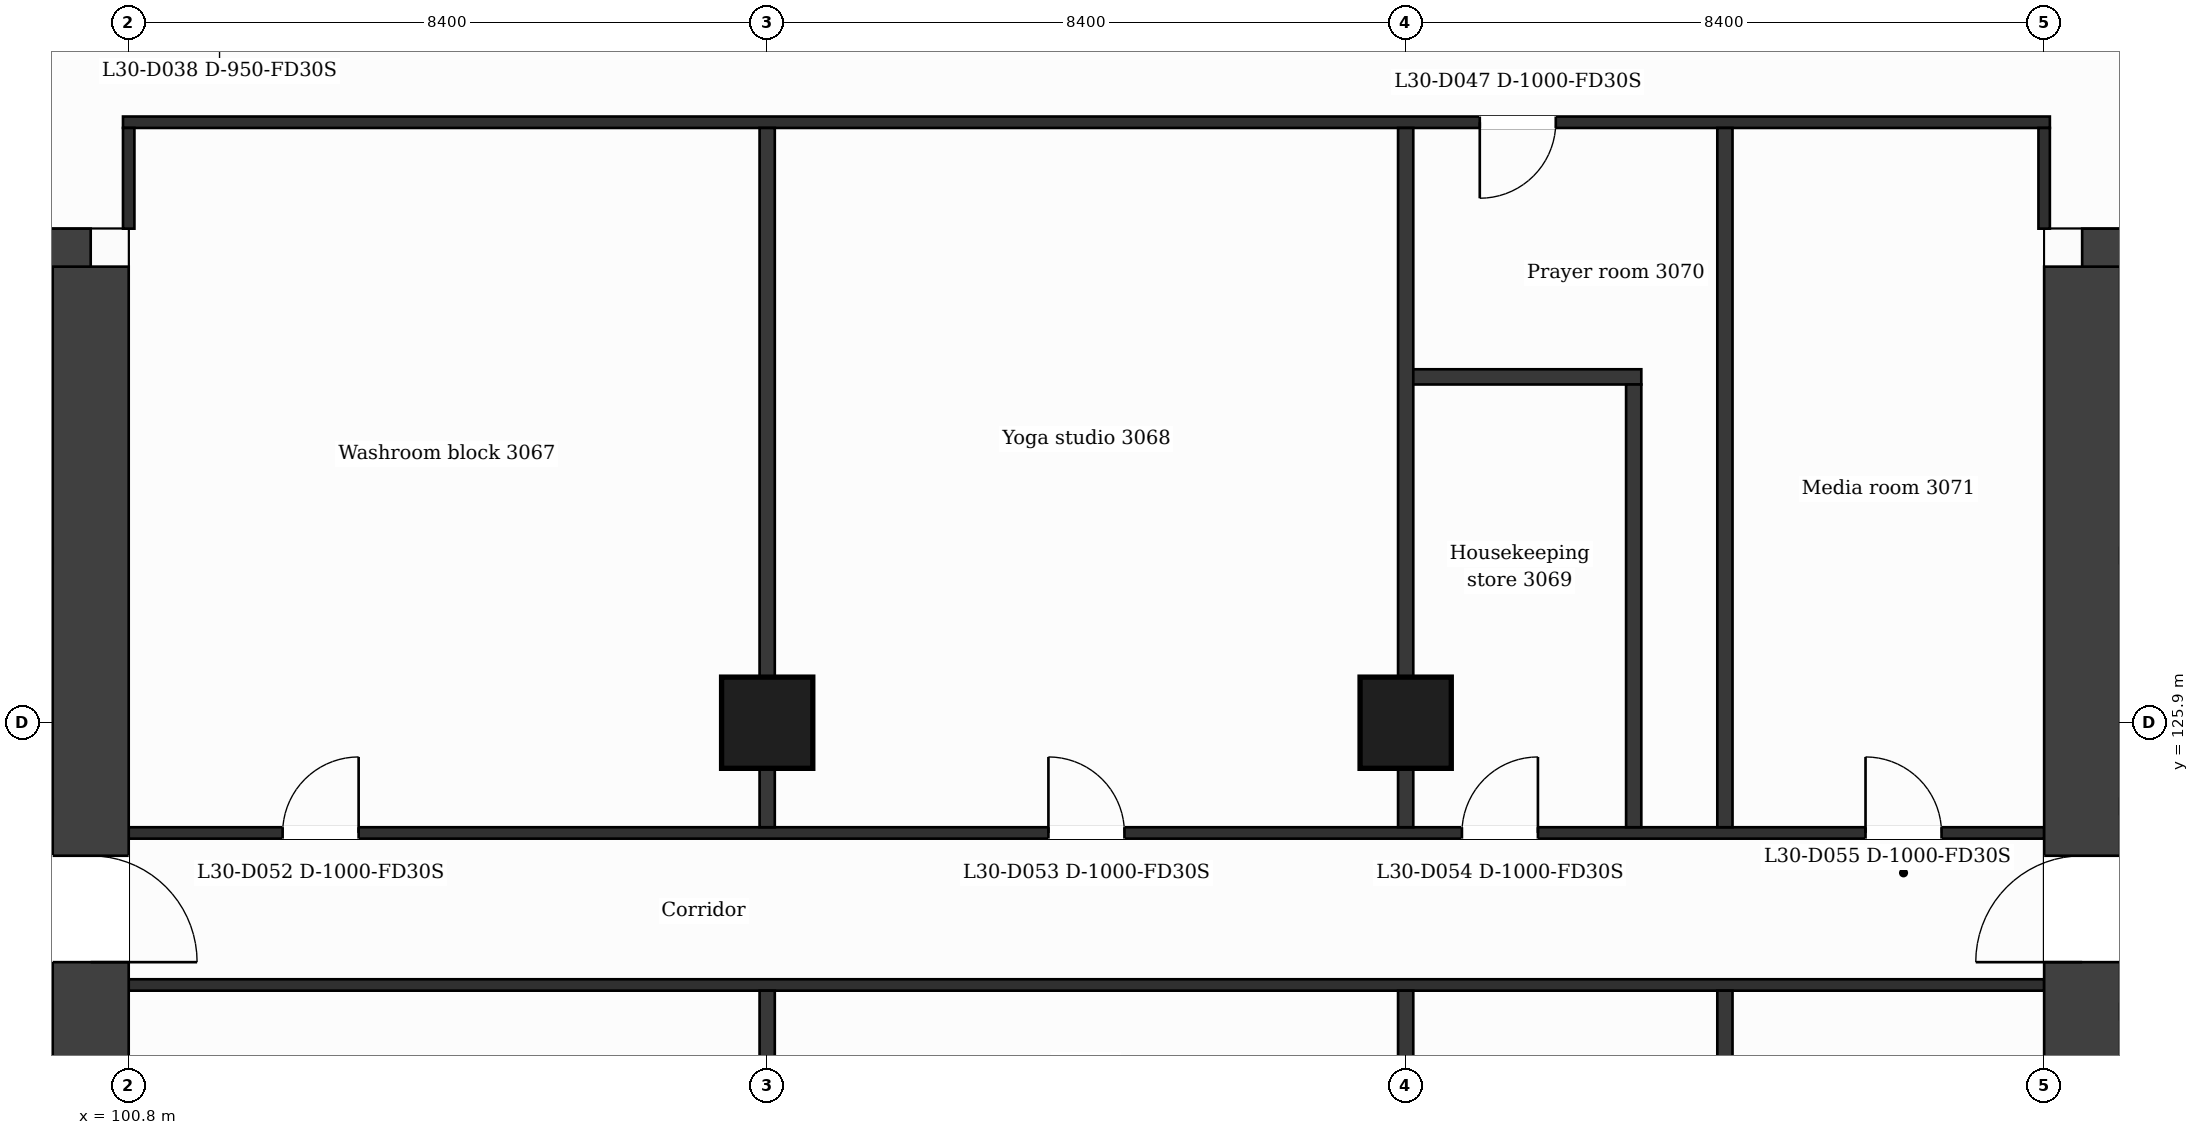
"""IFC4 building model, lengths in metres.
Left out: names, types, materials, properties, quantities, classifications, styles, units other than length and angle.
Written with IfcOpenShell. Run it as: python <this file> out.ifc"""

import sys

from ifc_helpers import new_model, si_unit, direction, frame, frame_2d, origin, origin_2d, place, context, subcontext, project, spatial, rectangle, extrude, element, fill, save


model = new_model("IFC4")
c1 = context("Model", 3, precision=1e-05, world=origin(), true_north=direction((0.0, 1.0)))
c2 = subcontext(c1, "Body", "Model", "MODEL_VIEW")
j1 = project(units=[si_unit("LENGTHUNIT", "METRE"), si_unit("PLANEANGLEUNIT", "RADIAN")], contexts=[c1])
p1 = place(None, origin())
s1 = spatial("IfcSite", under=j1, at=p1, CompositionType="ELEMENT")
p2 = place(p1, origin())
s2 = spatial("IfcBuilding", under=s1, at=p2, CompositionType="ELEMENT")
p3 = place(p2, frame((0.0, 0.0, 128.0)))
s3 = spatial("IfcBuildingStorey", under=s2, at=p3, CompositionType="ELEMENT", Elevation=128.0)
p4 = place(p3, frame((89.068, 131.9, 0.0), z_axis=(0.0, 0.0, 1.0), x_axis=(1.0, 0.0, 0.0)))
e1 = element("IfcWall", 1, at=p4, inside=s3, PredefinedType="SHEAR", context=c2, shape_type="SweptSolid", body=[
    extrude(rectangle(XDim=11.232, YDim=1.0, at=frame_2d((5.616, 0.0))), origin(), (0.0, 0.0, 1.0), 3.7),
])
p5 = place(p4, frame((6.646, 0.0, 0.0)))
e2 = element("IfcOpeningElement", 2, at=p5, cuts=e1, PredefinedType="OPENING", context=c2, shape_type="SweptSolid", body=[
    extrude(rectangle(XDim=1.2, YDim=2.1, at=frame_2d((0.6, 1.05))), frame((0.0, 0.51, 0.0), z_axis=(0.0, -1.0, 0.0), x_axis=(1.0, 0.0, 0.0)), (0.0, 0.0, 1.0), 1.02),
])
p6 = place(p3, frame((100.3, 131.9, 0.0), z_axis=(0.0, 0.0, 1.0), x_axis=(0.0, -1.0, 0.0)))
e3 = element("IfcWall", 3, at=p6, inside=s3, PredefinedType="SHEAR", context=c2, shape_type="SweptSolid", body=[
    extrude(rectangle(XDim=21.0, YDim=1.0, at=frame_2d((10.5, 0.0))), origin(), (0.0, 0.0, 1.0), 3.7),
])
p7 = place(p6, frame((7.75, 0.0, 0.0)))
e4 = element("IfcOpeningElement", 4, at=p7, cuts=e3, PredefinedType="OPENING", context=c2, shape_type="SweptSolid", body=[
    extrude(rectangle(XDim=1.4, YDim=2.1, at=frame_2d((0.7, 1.05))), frame((0.0, 0.51, 0.0), z_axis=(0.0, -1.0, 0.0), x_axis=(1.0, 0.0, 0.0)), (0.0, 0.0, 1.0), 1.02),
])
p8 = place(p3, frame((126.5, 131.9, 0.0), z_axis=(0.0, 0.0, 1.0), x_axis=(1.0, 0.0, 0.0)))
e5 = element("IfcWall", 5, at=p8, inside=s3, PredefinedType="SHEAR", context=c2, shape_type="SweptSolid", body=[
    extrude(rectangle(XDim=11.232, YDim=1.0, at=frame_2d((5.616, 0.0))), origin(), (0.0, 0.0, 1.0), 3.7),
])
p9 = place(p8, frame((3.386, 0.0, 0.0)))
e6 = element("IfcOpeningElement", 6, at=p9, cuts=e5, PredefinedType="OPENING", context=c2, shape_type="SweptSolid", body=[
    extrude(rectangle(XDim=1.2, YDim=2.1, at=frame_2d((0.6, 1.05))), frame((0.0, 0.51, 0.0), z_axis=(0.0, -1.0, 0.0), x_axis=(1.0, 0.0, 0.0)), (0.0, 0.0, 1.0), 1.02),
])
p10 = place(p3, frame((126.5, 110.9, 0.0), z_axis=(0.0, 0.0, 1.0), x_axis=(0.0, 1.0, 0.0)))
e7 = element("IfcWall", 7, at=p10, inside=s3, PredefinedType="SHEAR", context=c2, shape_type="SweptSolid", body=[
    extrude(rectangle(XDim=21.0, YDim=1.0, at=frame_2d((10.5, 0.0))), origin(), (0.0, 0.0, 1.0), 3.7),
])
p11 = place(p10, frame((11.85, 0.0, 0.0)))
e8 = element("IfcOpeningElement", 8, at=p11, cuts=e7, PredefinedType="OPENING", context=c2, shape_type="SweptSolid", body=[
    extrude(rectangle(XDim=1.4, YDim=2.1, at=frame_2d((0.7, 1.05))), frame((0.0, 0.51, 0.0), z_axis=(0.0, -1.0, 0.0), x_axis=(1.0, 0.0, 0.0)), (0.0, 0.0, 1.0), 1.02),
])
for number, where, z_axis, x_axis in (
    (9, (109.2, 125.9, 0.0), (0.0, 0.0, 1.0), (1.0, 0.0, 0.0)),
    (10, (117.6, 125.9, 0.0), (0.0, 0.0, 1.0), (1.0, 0.0, 0.0)),
):
    element("IfcColumn", number, at=place(p3, frame(where, z_axis=z_axis, x_axis=x_axis)), inside=s3, PredefinedType="COLUMN", context=c2, shape_type="SweptSolid", body=[
        extrude(rectangle(XDim=1.2, YDim=1.2, at=origin_2d()), origin(), (0.0, 0.0, 1.0), 3.7),
    ])
p12 = place(p3, frame((95.227, 122.1, 0.0), z_axis=(0.0, 0.0, 1.0), x_axis=(1.0, 0.0, 0.0)))
e11 = element("IfcWall", 11, at=p12, inside=s3, PredefinedType="PARTITIONING", context=c2, shape_type="SweptSolid", body=[
    extrude(rectangle(XDim=4.573, YDim=0.2, at=frame_2d((2.287, 0.0))), origin(), (0.0, 0.0, 1.0), 3.38),
])
p13 = place(p12, frame((0.865, 0.0, 0.0)))
e12 = element("IfcOpeningElement", 12, at=p13, cuts=e11, PredefinedType="OPENING", context=c2, shape_type="SweptSolid", body=[
    extrude(rectangle(XDim=0.9, YDim=2.1, at=frame_2d((0.45, 1.05))), frame((0.0, 0.11, 0.0), z_axis=(0.0, -1.0, 0.0), x_axis=(1.0, 0.0, 0.0)), (0.0, 0.0, 1.0), 0.22),
])
p14 = place(p12, frame((2.911, 0.0, 0.0)))
e13 = element("IfcOpeningElement", 13, at=p14, cuts=e11, PredefinedType="OPENING", context=c2, shape_type="SweptSolid", body=[
    extrude(rectangle(XDim=0.9, YDim=2.1, at=frame_2d((0.45, 1.05))), frame((0.0, 0.11, 0.0), z_axis=(0.0, -1.0, 0.0), x_axis=(1.0, 0.0, 0.0)), (0.0, 0.0, 1.0), 0.22),
])
p15 = place(p3, frame((100.8, 122.45, 0.0), z_axis=(0.0, 0.0, 1.0), x_axis=(1.0, 0.0, 0.0)))
e14 = element("IfcWall", 14, at=p15, inside=s3, PredefinedType="PARTITIONING", context=c2, shape_type="SweptSolid", body=[
    extrude(rectangle(XDim=25.2, YDim=0.15, at=frame_2d((12.6, 0.0))), origin(), (0.0, 0.0, 1.0), 3.38),
])
p16 = place(p3, frame((100.8, 124.45, 0.0), z_axis=(0.0, 0.0, 1.0), x_axis=(1.0, 0.0, 0.0)))
e15 = element("IfcWall", 15, at=p16, inside=s3, PredefinedType="PARTITIONING", context=c2, shape_type="SweptSolid", body=[
    extrude(rectangle(XDim=25.2, YDim=0.15, at=frame_2d((12.6, 0.0))), origin(), (0.0, 0.0, 1.0), 3.38),
])
p17 = place(p16, frame((2.025, 0.0, 0.0)))
e16 = element("IfcOpeningElement", 16, at=p17, cuts=e15, PredefinedType="OPENING", context=c2, shape_type="SweptSolid", body=[
    extrude(rectangle(XDim=1.0, YDim=2.1, at=frame_2d((0.5, 1.05))), frame((0.0, 0.085, 0.0), z_axis=(0.0, -1.0, 0.0), x_axis=(1.0, 0.0, 0.0)), (0.0, 0.0, 1.0), 0.17),
])
p18 = place(p16, frame((12.1, 0.0, 0.0)))
e17 = element("IfcOpeningElement", 17, at=p18, cuts=e15, PredefinedType="OPENING", context=c2, shape_type="SweptSolid", body=[
    extrude(rectangle(XDim=1.0, YDim=2.1, at=frame_2d((0.5, 1.05))), frame((0.0, 0.085, 0.0), z_axis=(0.0, -1.0, 0.0), x_axis=(1.0, 0.0, 0.0)), (0.0, 0.0, 1.0), 0.17),
])
p19 = place(p16, frame((17.54, 0.0, 0.0)))
e18 = element("IfcOpeningElement", 18, at=p19, cuts=e15, PredefinedType="OPENING", context=c2, shape_type="SweptSolid", body=[
    extrude(rectangle(XDim=1.0, YDim=2.1, at=frame_2d((0.5, 1.05))), frame((0.0, 0.085, 0.0), z_axis=(0.0, -1.0, 0.0), x_axis=(1.0, 0.0, 0.0)), (0.0, 0.0, 1.0), 0.17),
])
p20 = place(p16, frame((22.85, 0.0, 0.0)))
e19 = element("IfcOpeningElement", 19, at=p20, cuts=e15, PredefinedType="OPENING", context=c2, shape_type="SweptSolid", body=[
    extrude(rectangle(XDim=1.0, YDim=2.1, at=frame_2d((0.5, 1.05))), frame((0.0, 0.085, 0.0), z_axis=(0.0, -1.0, 0.0), x_axis=(1.0, 0.0, 0.0)), (0.0, 0.0, 1.0), 0.17),
])
p21 = place(p3, frame((127.0, 124.8, 0.0), z_axis=(0.0, 0.0, 1.0), x_axis=(1.0, 0.0, 0.0)))
e20 = element("IfcWall", 20, at=p21, inside=s3, PredefinedType="PARTITIONING", context=c2, shape_type="SweptSolid", body=[
    extrude(rectangle(XDim=4.649, YDim=0.2, at=frame_2d((2.324, 0.0))), origin(), (0.0, 0.0, 1.0), 3.38),
])
p22 = place(p21, frame((0.665, 0.0, 0.0)))
e21 = element("IfcOpeningElement", 21, at=p22, cuts=e20, PredefinedType="OPENING", context=c2, shape_type="SweptSolid", body=[
    extrude(rectangle(XDim=1.1, YDim=2.1, at=frame_2d((0.55, 1.05))), frame((0.0, 0.11, 0.0), z_axis=(0.0, -1.0, 0.0), x_axis=(1.0, 0.0, 0.0)), (0.0, 0.0, 1.0), 0.22),
])
p23 = place(p3, frame((127.0, 128.1, 0.0), z_axis=(0.0, 0.0, 1.0), x_axis=(1.0, 0.0, 0.0)))
e22 = element("IfcWall", 22, at=p23, inside=s3, PredefinedType="PARTITIONING", context=c2, shape_type="SweptSolid", body=[
    extrude(rectangle(XDim=4.649, YDim=0.2, at=frame_2d((2.324, 0.0))), origin(), (0.0, 0.0, 1.0), 3.38),
])
p24 = place(p23, frame((2.884, 0.0, 0.0)))
e23 = element("IfcOpeningElement", 23, at=p24, cuts=e22, PredefinedType="OPENING", context=c2, shape_type="SweptSolid", body=[
    extrude(rectangle(XDim=1.1, YDim=2.1, at=frame_2d((0.55, 1.05))), frame((0.0, 0.11, 0.0), z_axis=(0.0, -1.0, 0.0), x_axis=(1.0, 0.0, 0.0)), (0.0, 0.0, 1.0), 0.22),
])
p25 = place(p3, frame((117.6, 130.45, 0.0), z_axis=(0.0, 0.0, 1.0), x_axis=(1.0, 0.0, 0.0)))
e24 = element("IfcWall", 24, at=p25, inside=s3, PredefinedType="PARTITIONING", context=c2, shape_type="SweptSolid", body=[
    extrude(rectangle(XDim=3.1, YDim=0.2, at=frame_2d((1.55, 0.0))), origin(), (0.0, 0.0, 1.0), 3.38),
])
p26 = place(p3, frame((100.725, 133.8, 0.0), z_axis=(0.0, 0.0, 1.0), x_axis=(1.0, 0.0, 0.0)))
e25 = element("IfcWall", 25, at=p26, inside=s3, PredefinedType="PARTITIONING", context=c2, shape_type="SweptSolid", body=[
    extrude(rectangle(XDim=25.35, YDim=0.15, at=frame_2d((12.675, 0.0))), origin(), (0.0, 0.0, 1.0), 3.38),
])
p27 = place(p26, frame((17.85, 0.0, 0.0)))
e26 = element("IfcOpeningElement", 26, at=p27, cuts=e25, PredefinedType="OPENING", context=c2, shape_type="SweptSolid", body=[
    extrude(rectangle(XDim=1.0, YDim=2.1, at=frame_2d((0.5, 1.05))), frame((0.0, 0.085, 0.0), z_axis=(0.0, -1.0, 0.0), x_axis=(1.0, 0.0, 0.0)), (0.0, 0.0, 1.0), 0.17),
])
p28 = place(p3, frame((100.8, 132.4, 0.0), z_axis=(0.0, 0.0, 1.0), x_axis=(0.0, 1.0, 0.0)))
e27 = element("IfcWall", 27, at=p28, inside=s3, PredefinedType="PARTITIONING", context=c2, shape_type="SweptSolid", body=[
    extrude(rectangle(XDim=1.325, YDim=0.15, at=frame_2d((0.663, 0.0))), origin(), (0.0, 0.0, 1.0), 3.38),
])
p29 = place(p3, frame((109.2, 109.075, 0.0), z_axis=(0.0, 0.0, 1.0), x_axis=(0.0, 1.0, 0.0)))
e28 = element("IfcWall", 28, at=p29, inside=s3, PredefinedType="PARTITIONING", context=c2, shape_type="SweptSolid", body=[
    extrude(rectangle(XDim=13.3, YDim=0.2, at=frame_2d((6.65, 0.0))), origin(), (0.0, 0.0, 1.0), 3.38),
])
p30 = place(p3, frame((109.2, 124.525, 0.0), z_axis=(0.0, 0.0, 1.0), x_axis=(0.0, 1.0, 0.0)))
e29 = element("IfcWall", 29, at=p30, inside=s3, PredefinedType="PARTITIONING", context=c2, shape_type="SweptSolid", body=[
    extrude(rectangle(XDim=9.2, YDim=0.2, at=frame_2d((4.6, 0.0))), origin(), (0.0, 0.0, 1.0), 3.38),
])
p31 = place(p3, frame((117.6, 109.075, 0.0), z_axis=(0.0, 0.0, 1.0), x_axis=(0.0, 1.0, 0.0)))
e30 = element("IfcWall", 30, at=p31, inside=s3, PredefinedType="PARTITIONING", context=c2, shape_type="SweptSolid", body=[
    extrude(rectangle(XDim=13.3, YDim=0.2, at=frame_2d((6.65, 0.0))), origin(), (0.0, 0.0, 1.0), 3.38),
])
p32 = place(p3, frame((117.6, 124.525, 0.0), z_axis=(0.0, 0.0, 1.0), x_axis=(0.0, 1.0, 0.0)))
e31 = element("IfcWall", 31, at=p32, inside=s3, PredefinedType="PARTITIONING", context=c2, shape_type="SweptSolid", body=[
    extrude(rectangle(XDim=9.2, YDim=0.2, at=frame_2d((4.6, 0.0))), origin(), (0.0, 0.0, 1.0), 3.38),
])
p33 = place(p3, frame((120.6, 124.525, 0.0), z_axis=(0.0, 0.0, 1.0), x_axis=(0.0, 1.0, 0.0)))
e32 = element("IfcWall", 32, at=p33, inside=s3, PredefinedType="PARTITIONING", context=c2, shape_type="SweptSolid", body=[
    extrude(rectangle(XDim=5.825, YDim=0.2, at=frame_2d((2.913, 0.0))), origin(), (0.0, 0.0, 1.0), 3.38),
])
p34 = place(p3, frame((121.8, 109.075, 0.0), z_axis=(0.0, 0.0, 1.0), x_axis=(0.0, 1.0, 0.0)))
e33 = element("IfcWall", 33, at=p34, inside=s3, PredefinedType="PARTITIONING", context=c2, shape_type="SweptSolid", body=[
    extrude(rectangle(XDim=13.3, YDim=0.2, at=frame_2d((6.65, 0.0))), origin(), (0.0, 0.0, 1.0), 3.38),
])
p35 = place(p3, frame((121.8, 124.525, 0.0), z_axis=(0.0, 0.0, 1.0), x_axis=(0.0, 1.0, 0.0)))
e34 = element("IfcWall", 34, at=p35, inside=s3, PredefinedType="PARTITIONING", context=c2, shape_type="SweptSolid", body=[
    extrude(rectangle(XDim=9.2, YDim=0.2, at=frame_2d((4.6, 0.0))), origin(), (0.0, 0.0, 1.0), 3.38),
])
p36 = place(p3, frame((126.0, 132.4, 0.0), z_axis=(0.0, 0.0, 1.0), x_axis=(0.0, 1.0, 0.0)))
e35 = element("IfcWall", 35, at=p36, inside=s3, PredefinedType="PARTITIONING", context=c2, shape_type="SweptSolid", body=[
    extrude(rectangle(XDim=1.325, YDim=0.15, at=frame_2d((0.663, 0.0))), origin(), (0.0, 0.0, 1.0), 3.38),
])
p37 = place(p27, origin())
e36 = element("IfcDoor", 36, at=p37, inside=s3, OperationType="SINGLE_SWING_LEFT", PredefinedType="DOOR", context=c2, shape_type="SweptSolid", body=[
    extrude(rectangle(XDim=1.0, YDim=2.1, at=frame_2d((0.5, 1.05))), frame((0.0, 0.025, 0.0), z_axis=(0.0, -1.0, 0.0), x_axis=(1.0, 0.0, 0.0)), (0.0, 0.0, 1.0), 0.05),
])
fill(e26, e36)
p38 = place(p17, origin())
e37 = element("IfcDoor", 37, at=p38, inside=s3, OperationType="SINGLE_SWING_RIGHT", PredefinedType="DOOR", context=c2, shape_type="SweptSolid", body=[
    extrude(rectangle(XDim=1.0, YDim=2.1, at=frame_2d((0.5, 1.05))), frame((0.0, 0.025, 0.0), z_axis=(0.0, -1.0, 0.0), x_axis=(1.0, 0.0, 0.0)), (0.0, 0.0, 1.0), 0.05),
])
fill(e16, e37)
p39 = place(p18, origin())
e38 = element("IfcDoor", 38, at=p39, inside=s3, OperationType="SINGLE_SWING_LEFT", PredefinedType="DOOR", context=c2, shape_type="SweptSolid", body=[
    extrude(rectangle(XDim=1.0, YDim=2.1, at=frame_2d((0.5, 1.05))), frame((0.0, 0.025, 0.0), z_axis=(0.0, -1.0, 0.0), x_axis=(1.0, 0.0, 0.0)), (0.0, 0.0, 1.0), 0.05),
])
fill(e17, e38)
p40 = place(p19, origin())
e39 = element("IfcDoor", 39, at=p40, inside=s3, OperationType="SINGLE_SWING_RIGHT", PredefinedType="DOOR", context=c2, shape_type="SweptSolid", body=[
    extrude(rectangle(XDim=1.0, YDim=2.1, at=frame_2d((0.5, 1.05))), frame((0.0, 0.025, 0.0), z_axis=(0.0, -1.0, 0.0), x_axis=(1.0, 0.0, 0.0)), (0.0, 0.0, 1.0), 0.05),
])
fill(e18, e39)
p41 = place(p20, origin())
e40 = element("IfcDoor", 40, at=p41, inside=s3, OperationType="SINGLE_SWING_LEFT", PredefinedType="DOOR", context=c2, shape_type="SweptSolid", body=[
    extrude(rectangle(XDim=1.0, YDim=2.1, at=frame_2d((0.5, 1.05))), frame((0.0, 0.025, 0.0), z_axis=(0.0, -1.0, 0.0), x_axis=(1.0, 0.0, 0.0)), (0.0, 0.0, 1.0), 0.05),
])
fill(e19, e40)
p42 = place(p7, origin())
e41 = element("IfcDoor", 41, at=p42, inside=s3, OperationType="SINGLE_SWING_RIGHT", PredefinedType="DOOR", context=c2, shape_type="SweptSolid", body=[
    extrude(rectangle(XDim=1.4, YDim=2.1, at=frame_2d((0.7, 1.05))), frame((0.0, 0.025, 0.0), z_axis=(0.0, -1.0, 0.0), x_axis=(1.0, 0.0, 0.0)), (0.0, 0.0, 1.0), 0.05),
])
fill(e4, e41)
p43 = place(p11, origin())
e42 = element("IfcDoor", 42, at=p43, inside=s3, OperationType="SINGLE_SWING_LEFT", PredefinedType="DOOR", context=c2, shape_type="SweptSolid", body=[
    extrude(rectangle(XDim=1.4, YDim=2.1, at=frame_2d((0.7, 1.05))), frame((0.0, 0.025, 0.0), z_axis=(0.0, -1.0, 0.0), x_axis=(1.0, 0.0, 0.0)), (0.0, 0.0, 1.0), 0.05),
])
fill(e8, e42)
save(model, sys.argv[1])
